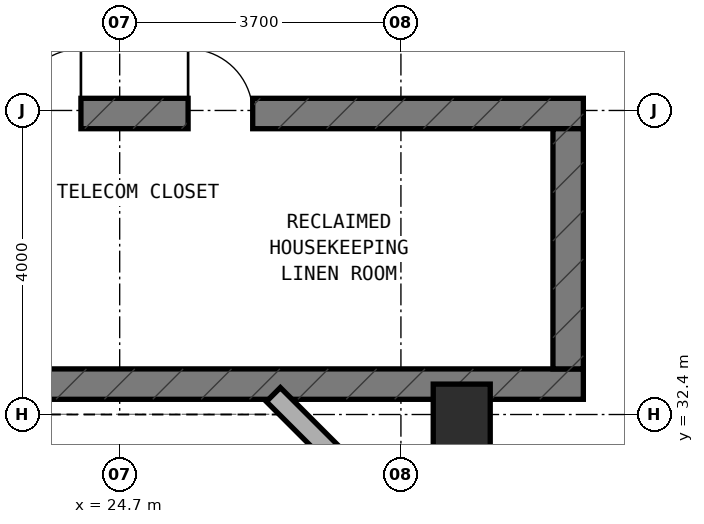
"""IFC4 building model, lengths in metres.
Left out: names, types, materials, properties, quantities, classifications, styles, units other than length and angle.
Written with IfcOpenShell. Run it as: python <this file> out.ifc"""

import sys

from ifc_helpers import new_model, si_unit, direction, frame, frame_2d, origin, origin_2d, place, context, subcontext, project, spatial, rectangle, extrude, element, fill, save


model = new_model("IFC4")
c1 = context("Model", 3, precision=1e-05, world=origin(), true_north=direction((0.0, 1.0)))
c2 = subcontext(c1, "Body", "Model", "MODEL_VIEW")
j1 = project(units=[si_unit("LENGTHUNIT", "METRE"), si_unit("PLANEANGLEUNIT", "RADIAN")], contexts=[c1])
p1 = place(None, origin())
s1 = spatial("IfcSite", under=j1, at=p1, CompositionType="ELEMENT")
p2 = place(p1, origin())
s2 = spatial("IfcBuilding", under=s1, at=p2, CompositionType="ELEMENT")
p3 = place(p2, frame((0.0, 0.0, 224.3)))
s3 = spatial("IfcBuildingStorey", under=s2, at=p3, CompositionType="ELEMENT", Elevation=224.3)
p4 = place(p3, frame((6.4, 32.8, 0.0), z_axis=(0.0, 0.0, 1.0), x_axis=(1.0, 0.0, 0.0)))
e1 = element("IfcWall", 1, at=p4, inside=s3, PredefinedType="SHEAR", context=c2, shape_type="SweptSolid", body=[
    extrude(rectangle(XDim=24.4, YDim=0.4, at=frame_2d((12.2, 0.0))), origin(), (0.0, 0.0, 1.0), 3.6),
])
p5 = place(p4, frame((6.05, 0.0, 0.0)))
e2 = element("IfcOpeningElement", 2, at=p5, cuts=e1, PredefinedType="OPENING", context=c2, shape_type="SweptSolid", body=[
    extrude(rectangle(XDim=1.1, YDim=2.15, at=frame_2d((0.55, 1.075))), frame((0.0, 0.21, 0.0), z_axis=(0.0, -1.0, 0.0), x_axis=(1.0, 0.0, 0.0)), (0.0, 0.0, 1.0), 0.42),
])
p6 = place(p3, frame((6.4, 36.36, 0.0), z_axis=(0.0, 0.0, 1.0), x_axis=(1.0, 0.0, 0.0)))
e3 = element("IfcWall", 3, at=p6, inside=s3, PredefinedType="SHEAR", context=c2, shape_type="SweptSolid", body=[
    extrude(rectangle(XDim=24.4, YDim=0.4, at=frame_2d((12.2, 0.0))), origin(), (0.0, 0.0, 1.0), 3.6),
])
p7 = place(p6, frame((9.15, 0.0, 0.0)))
e4 = element("IfcOpeningElement", 4, at=p7, cuts=e3, PredefinedType="OPENING", context=c2, shape_type="SweptSolid", body=[
    extrude(rectangle(XDim=1.2, YDim=2.15, at=frame_2d((0.6, 1.075))), frame((0.0, 0.21, 0.0), z_axis=(0.0, -1.0, 0.0), x_axis=(1.0, 0.0, 0.0)), (0.0, 0.0, 1.0), 0.42),
])
p8 = place(p6, frame((19.2, 0.0, 0.0)))
e5 = element("IfcOpeningElement", 5, at=p8, cuts=e3, PredefinedType="OPENING", context=c2, shape_type="SweptSolid", body=[
    extrude(rectangle(XDim=0.85, YDim=2.1, at=frame_2d((0.425, 1.05))), frame((0.0, 0.21, 0.0), z_axis=(0.0, -1.0, 0.0), x_axis=(1.0, 0.0, 0.0)), (0.0, 0.0, 1.0), 0.42),
])
p9 = place(p6, frame((16.94, 0.0, 0.0)))
e6 = element("IfcOpeningElement", 6, at=p9, cuts=e3, PredefinedType="OPENING", context=c2, shape_type="SweptSolid", body=[
    extrude(rectangle(XDim=0.85, YDim=2.1, at=frame_2d((0.425, 1.05))), frame((0.0, 0.21, 0.0), z_axis=(0.0, -1.0, 0.0), x_axis=(1.0, 0.0, 0.0)), (0.0, 0.0, 1.0), 0.42),
])
p10 = place(p3, frame((30.6, 33.0, 0.0), z_axis=(0.0, 0.0, 1.0), x_axis=(0.0, 1.0, 0.0)))
e7 = element("IfcWall", 7, at=p10, inside=s3, PredefinedType="SHEAR", context=c2, shape_type="SweptSolid", body=[
    extrude(rectangle(XDim=3.16, YDim=0.4, at=frame_2d((1.58, 0.0))), origin(), (0.0, 0.0, 1.0), 3.6),
])
p11 = place(p3, frame((29.2, 32.35, 0.0), z_axis=(0.0, 0.0, 1.0), x_axis=(1.0, 0.0, 0.0)))
e8 = element("IfcColumn", 8, at=p11, inside=s3, PredefinedType="COLUMN", context=c2, shape_type="SweptSolid", body=[
    extrude(rectangle(XDim=0.75, YDim=0.9, at=origin_2d()), origin(), (0.0, 0.0, 1.0), 3.6),
])
p12 = place(p3, frame((28.556, 30.828, 0.0), z_axis=(0.0, 0.0, 1.0), x_axis=(-0.707059717605, 0.707153841636, 0.0)))
e9 = element("IfcWall", 9, at=p12, inside=s3, PredefinedType="STANDARD", context=c2, shape_type="SweptSolid", body=[
    extrude(rectangle(XDim=2.594, YDim=0.26, at=frame_2d((1.297, 0.0))), origin(), (0.0, 0.0, 1.0), 3.32),
])
p13 = place(p8, origin())
e10 = element("IfcDoor", 10, at=p13, inside=s3, OperationType="SINGLE_SWING_LEFT", PredefinedType="DOOR", context=c2, shape_type="SweptSolid", body=[
    extrude(rectangle(XDim=0.85, YDim=2.1, at=frame_2d((0.425, 1.05))), frame((0.0, 0.025, 0.0), z_axis=(0.0, -1.0, 0.0), x_axis=(1.0, 0.0, 0.0)), (0.0, 0.0, 1.0), 0.05),
])
fill(e5, e10)
p14 = place(p9, origin())
e11 = element("IfcDoor", 11, at=p14, inside=s3, OperationType="SINGLE_SWING_RIGHT", PredefinedType="DOOR", context=c2, shape_type="SweptSolid", body=[
    extrude(rectangle(XDim=0.85, YDim=2.1, at=frame_2d((0.425, 1.05))), frame((0.0, 0.025, 0.0), z_axis=(0.0, -1.0, 0.0), x_axis=(1.0, 0.0, 0.0)), (0.0, 0.0, 1.0), 0.05),
])
fill(e6, e11)
save(model, sys.argv[1])
